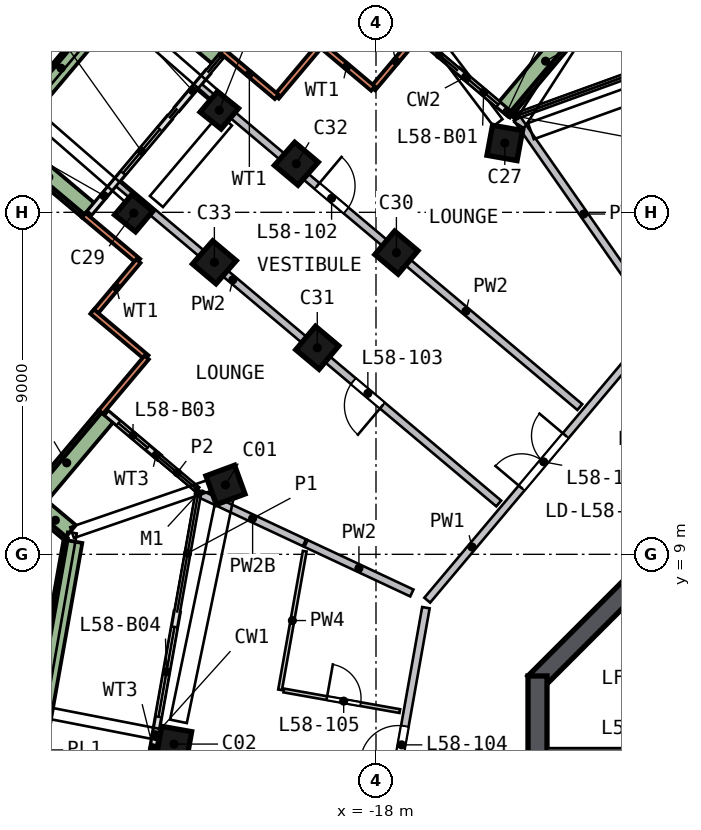
"""IFC4 building model, lengths in metres.
Left out: names, types, materials, properties, quantities, classifications, styles, units other than length and angle.
Written with IfcOpenShell. Run it as: python <this file> out.ifc"""

import sys

from ifc_helpers import new_model, si_unit, direction, frame, frame_2d, origin, origin_2d, place, context, subcontext, project, spatial, polyline, rectangle, outline, extrude, element, fill, save


model = new_model("IFC4")
c1 = context("Model", 3, precision=1e-05, world=origin(), true_north=direction((0.0, 1.0)))
c2 = subcontext(c1, "Body", "Model", "MODEL_VIEW")
j1 = project(units=[si_unit("LENGTHUNIT", "METRE"), si_unit("PLANEANGLEUNIT", "RADIAN")], contexts=[c1])
p1 = place(None, origin())
s1 = spatial("IfcSite", under=j1, at=p1, CompositionType="ELEMENT")
p2 = place(p1, origin())
s2 = spatial("IfcBuilding", under=s1, at=p2, CompositionType="ELEMENT")
p3 = place(p2, frame((0.0, 0.0, 237.5)))
s3 = spatial("IfcBuildingStorey", under=s2, at=p3, CompositionType="ELEMENT", Elevation=237.5)
p4 = place(p3, frame((-21.899, 10.952, 0.0), z_axis=(-0.051233202, -0.104594786, 0.993194387), x_axis=(-0.345877512, 0.934811029, 0.08060451)))
e1 = element("IfcColumn", 1, at=p4, inside=s3, PredefinedType="COLUMN", context=c2, shape_type="SweptSolid", body=[
    extrude(rectangle(XDim=0.8, YDim=0.8, at=origin_2d()), origin(), (0.0, 0.0, 1.0), 3.212),
])
p5 = place(p3, frame((-23.293, 4.141, 0.0), z_axis=(-0.018783788, -0.111029677, 0.993639562), x_axis=(-0.174054393, -0.978276827, -0.112603368)))
e2 = element("IfcColumn", 2, at=p5, inside=s3, PredefinedType="COLUMN", context=c2, shape_type="SweptSolid", body=[
    extrude(rectangle(XDim=0.8, YDim=0.8, at=origin_2d()), origin(), (0.0, 0.0, 1.0), 3.21),
])
p6 = place(p3, frame((-14.497, 19.91, 0.0), z_axis=(-0.094097867, -0.069699308, 0.993120133), x_axis=(0.980134973, -0.18142167, 0.080134963)))
e3 = element("IfcColumn", 3, at=p6, inside=s3, PredefinedType="COLUMN", context=c2, shape_type="SweptSolid", body=[
    extrude(rectangle(XDim=0.8, YDim=0.8, at=origin_2d()), origin(), (0.0, 0.0, 1.0), 3.212),
])
p7 = place(p3, frame((-21.863, 20.698, 0.0), z_axis=(-0.212105065, -0.008600875, 0.977209019), x_axis=(-0.619955277, -0.771799259, -0.141355432)))
e4 = element("IfcColumn", 4, at=p7, inside=s3, PredefinedType="COLUMN", context=c2, shape_type="SweptSolid", body=[
    extrude(rectangle(XDim=0.7, YDim=0.7, at=origin_2d()), origin(), (0.0, 0.0, 1.0), 3.264),
])
p8 = place(p3, frame((-24.129, 18.004, 0.0), z_axis=(-0.199957249, -0.019118522, 0.979618079), x_axis=(-0.621808188, -0.770197259, -0.141953371)))
e5 = element("IfcColumn", 5, at=p8, inside=s3, PredefinedType="COLUMN", context=c2, shape_type="SweptSolid", body=[
    extrude(rectangle(XDim=0.7, YDim=0.7, at=origin_2d()), origin(), (0.0, 0.0, 1.0), 3.256),
])
for number, where, z_axis, x_axis in (
    (6, (-17.366, 17.039, 0.0), (-0.08, -0.083, 0.993), (-0.765, 0.644, -0.008)),
    (7, (-19.463, 14.548, 0.0), (-0.068, -0.093, 0.993), (-0.766, 0.643, 0.008)),
):
    element("IfcColumn", number, at=place(p3, frame(where, z_axis=z_axis, x_axis=x_axis)), inside=s3, PredefinedType="COLUMN", context=c2, shape_type="SweptSolid", body=[
        extrude(rectangle(XDim=0.8, YDim=0.8, at=origin_2d()), origin(), (0.0, 0.0, 1.0), 3.211),
    ])
p9 = place(p3, frame((-19.843, 19.277, 0.0), z_axis=(-0.20588585, 0.000823843, 0.978575668), x_axis=(-0.742112726, 0.65170449, -0.156684267)))
e8 = element("IfcColumn", 8, at=p9, inside=s3, PredefinedType="COLUMN", context=c2, shape_type="SweptSolid", body=[
    extrude(rectangle(XDim=0.8, YDim=0.8, at=origin_2d()), origin(), (0.0, 0.0, 1.0), 3.26),
])
p10 = place(p3, frame((-22.015, 16.696, 0.0), z_axis=(-0.194071634, -0.009234356, 0.980943896), x_axis=(-0.745162414, 0.651744147, -0.141288865)))
e9 = element("IfcColumn", 9, at=p10, inside=s3, PredefinedType="COLUMN", context=c2, shape_type="SweptSolid", body=[
    extrude(rectangle(XDim=0.8, YDim=0.8, at=origin_2d()), origin(), (0.0, 0.0, 1.0), 3.252),
])
p11 = place(p3, frame((-5.622, 13.823, 0.0), z_axis=(0.0, 0.0, 1.0), x_axis=(-0.707106781, -0.707106781, 0.0)))
e10 = element("IfcWall", 10, at=p11, inside=s3, PredefinedType="SHEAR", context=c2, shape_type="SweptSolid", body=[
    extrude(rectangle(XDim=11.598, YDim=0.5, at=frame_2d((5.799, 0.0))), origin(), (0.0, 0.0, 1.0), 3.5),
])
p12 = place(p3, frame((-13.75, 5.799, 0.0), z_axis=(0.0, 0.0, 1.0), x_axis=(0.0, -1.0, 0.0)))
e11 = element("IfcWall", 11, at=p12, inside=s3, PredefinedType="SHEAR", context=c2, shape_type="SweptSolid", body=[
    extrude(rectangle(XDim=11.598, YDim=0.5, at=frame_2d((5.799, 0.0))), origin(), (0.0, 0.0, 1.0), 3.5),
])
p13 = place(p12, frame((4.899, 0.0, 0.0)))
e12 = element("IfcOpeningElement", 12, at=p13, cuts=e11, PredefinedType="OPENING", context=c2, shape_type="SweptSolid", body=[
    extrude(rectangle(XDim=1.8, YDim=2.1, at=frame_2d((0.9, 1.05))), frame((0.0, 0.26, 0.0), z_axis=(0.0, -1.0, 0.0), x_axis=(1.0, 0.0, 0.0)), (0.0, 0.0, 1.0), 0.52),
])
p14 = place(p3, frame((-16.871, 22.692, 0.0), z_axis=(0.0, 0.0, 1.0), x_axis=(-0.64389112, -0.765117132, 0.0)))
e13 = element("IfcWall", 13, at=p14, inside=s3, PredefinedType="SOLIDWALL", context=c2, shape_type="SweptSolid", body=[
    extrude(rectangle(XDim=1.875, YDim=0.15, at=frame_2d((0.938, 0.0))), origin(), (0.0, 0.0, 1.0), 3.19),
])
p15 = place(p3, frame((-18.079, 21.258, 0.0), z_axis=(0.0, 0.0, 1.0), x_axis=(-0.765188969, 0.643805749, 0.0)))
e14 = element("IfcWall", 14, at=p15, inside=s3, PredefinedType="SOLIDWALL", context=c2, shape_type="SweptSolid", body=[
    extrude(rectangle(XDim=1.8, YDim=0.15, at=frame_2d((0.9, 0.0))), origin(), (0.0, 0.0, 1.0), 3.19),
])
p16 = place(p3, frame((-19.408, 22.474, 0.0), z_axis=(0.0, 0.0, 1.0), x_axis=(-0.643826975, -0.765171109, 0.0)))
e15 = element("IfcWall", 15, at=p16, inside=s3, PredefinedType="SOLIDWALL", context=c2, shape_type="SweptSolid", body=[
    extrude(rectangle(XDim=1.875, YDim=0.15, at=frame_2d((0.938, 0.0))), origin(), (0.0, 0.0, 1.0), 3.19),
])
for number, where, z_axis, x_axis in (
    (16, (-20.615, 21.039, 0.0), (0.0, 0.0, 1.0), (-0.765, 0.644, 0.0)),
    (17, (-25.687, 17.923, 0.0), (0.0, 0.0, 1.0), (0.765, -0.644, 0.0)),
):
    element("IfcWall", number, at=place(p3, frame(where, z_axis=z_axis, x_axis=x_axis)), inside=s3, PredefinedType="SOLIDWALL", context=c2, shape_type="SweptSolid", body=[
        extrude(rectangle(XDim=1.875, YDim=0.15, at=frame_2d((0.938, 0.0))), origin(), (0.0, 0.0, 1.0), 3.19),
    ])
p17 = place(p3, frame((-24.253, 16.716, 0.0), z_axis=(0.0, 0.0, 1.0), x_axis=(-0.643872566, -0.765132746, 0.0)))
e18 = element("IfcWall", 18, at=p17, inside=s3, PredefinedType="SOLIDWALL", context=c2, shape_type="SweptSolid", body=[
    extrude(rectangle(XDim=1.8, YDim=0.15, at=frame_2d((0.9, 0.0))), origin(), (0.0, 0.0, 1.0), 3.19),
])
p18 = place(p3, frame((-25.469, 15.387, 0.0), z_axis=(0.0, 0.0, 1.0), x_axis=(0.765117132, -0.64389112, 0.0)))
e19 = element("IfcWall", 19, at=p18, inside=s3, PredefinedType="SOLIDWALL", context=c2, shape_type="SweptSolid", body=[
    extrude(rectangle(XDim=1.875, YDim=0.15, at=frame_2d((0.938, 0.0))), origin(), (0.0, 0.0, 1.0), 3.19),
])
p19 = place(p3, frame((-24.034, 14.18, 0.0), z_axis=(0.0, 0.0, 1.0), x_axis=(-0.643826975, -0.765171109, 0.0)))
e20 = element("IfcWall", 20, at=p19, inside=s3, PredefinedType="SOLIDWALL", context=c2, shape_type="SweptSolid", body=[
    extrude(rectangle(XDim=1.875, YDim=0.15, at=frame_2d((0.938, 0.0))), origin(), (0.0, 0.0, 1.0), 3.19),
])
p20 = place(p3, frame((-14.478, 20.58, 0.0), z_axis=(0.0, 0.0, 1.0), x_axis=(-0.765132746, 0.643872566, 0.0)))
e21 = element("IfcWall", 21, at=p20, inside=s3, PredefinedType="SOLIDWALL", context=c2, shape_type="SweptSolid", body=[
    extrude(rectangle(XDim=1.8, YDim=0.15, at=frame_2d((0.9, 0.0))), origin(), (0.0, 0.0, 1.0), 2.525),
])
p21 = place(p20, frame((0.4, 0.0, 0.0)))
e22 = element("IfcOpeningElement", 22, at=p21, cuts=e21, PredefinedType="OPENING", context=c2, shape_type="SweptSolid", body=[
    extrude(rectangle(XDim=1.0, YDim=2.4, at=frame_2d((0.5, 1.2))), frame((0.0, 0.085, 0.0), z_axis=(0.0, -1.0, 0.0), x_axis=(1.0, 0.0, 0.0)), (0.0, 0.0, 1.0), 0.17),
])
p22 = place(p3, frame((-23.431, 20.488, 0.0), z_axis=(0.0, 0.0, 1.0), x_axis=(-0.643838196, -0.765161667, 0.0)))
e23 = element("IfcWall", 23, at=p22, inside=s3, PredefinedType="SOLIDWALL", context=c2, shape_type="SweptSolid", body=[
    extrude(rectangle(XDim=3.26, YDim=0.15, at=frame_2d((1.63, 0.0))), origin(), (0.0, 0.0, 1.0), 2.525),
])
p23 = place(p22, frame((0.4, 0.0, 0.0)))
e24 = element("IfcOpeningElement", 24, at=p23, cuts=e23, PredefinedType="OPENING", context=c2, shape_type="SweptSolid", body=[
    extrude(rectangle(XDim=1.5, YDim=2.4, at=frame_2d((0.75, 1.2))), frame((0.0, 0.085, 0.0), z_axis=(0.0, -1.0, 0.0), x_axis=(1.0, 0.0, 0.0)), (0.0, 0.0, 1.0), 0.17),
])
p24 = place(p3, frame((-22.42, 21.689, 0.0), z_axis=(0.0, 0.0, 1.0), x_axis=(-0.643815345, -0.765180895, 0.0)))
e25 = element("IfcWall", 25, at=p24, inside=s3, PredefinedType="SOLIDWALL", context=c2, shape_type="SweptSolid", body=[
    extrude(rectangle(XDim=1.267, YDim=0.15, at=frame_2d((0.634, 0.0))), origin(), (0.0, 0.0, 1.0), 2.525),
])
p25 = place(p3, frame((-25.082, 12.709, 0.0), z_axis=(0.0, 0.0, 1.0), x_axis=(0.765132746, -0.643872566, 0.0)))
e26 = element("IfcWall", 26, at=p25, inside=s3, PredefinedType="SOLIDWALL", context=c2, shape_type="SweptSolid", body=[
    extrude(rectangle(XDim=1.8, YDim=0.15, at=frame_2d((0.9, 0.0))), origin(), (0.0, 0.0, 1.0), 2.525),
])
p26 = place(p25, frame((0.4, 0.0, 0.0)))
e27 = element("IfcOpeningElement", 27, at=p26, cuts=e26, PredefinedType="OPENING", context=c2, shape_type="SweptSolid", body=[
    extrude(rectangle(XDim=1.0, YDim=2.4, at=frame_2d((0.5, 1.2))), frame((0.0, 0.085, 0.0), z_axis=(0.0, -1.0, 0.0), x_axis=(1.0, 0.0, 0.0)), (0.0, 0.0, 1.0), 0.17),
])
p27 = place(p3, frame((-23.232, 7.482, 0.0), z_axis=(0.0, 0.0, 1.0), x_axis=(-0.175042897, -0.984560808, 0.0)))
e28 = element("IfcWall", 28, at=p27, inside=s3, PredefinedType="SOLIDWALL", context=c2, shape_type="SweptSolid", body=[
    extrude(rectangle(XDim=3.3, YDim=0.15, at=frame_2d((1.65, 0.0))), origin(), (0.0, 0.0, 1.0), 2.525),
])
p28 = place(p27, frame((0.4, 0.0, 0.0)))
e29 = element("IfcOpeningElement", 29, at=p28, cuts=e28, PredefinedType="OPENING", context=c2, shape_type="SweptSolid", body=[
    extrude(rectangle(XDim=2.4, YDim=2.4, at=frame_2d((1.2, 1.2))), frame((0.0, 0.085, 0.0), z_axis=(0.0, -1.0, 0.0), x_axis=(1.0, 0.0, 0.0)), (0.0, 0.0, 1.0), 0.17),
])
p29 = place(p3, frame((-23.81, 4.233, 0.0), z_axis=(0.0, 0.0, 1.0), x_axis=(-0.175040517, -0.984561231, 0.0)))
e30 = element("IfcWall", 30, at=p29, inside=s3, PredefinedType="SOLIDWALL", context=c2, shape_type="SweptSolid", body=[
    extrude(rectangle(XDim=3.661, YDim=0.15, at=frame_2d((1.831, 0.0))), origin(), (0.0, 0.0, 1.0), 2.525),
])
p30 = place(p29, frame((0.861, 0.0, 0.0)))
e31 = element("IfcOpeningElement", 31, at=p30, cuts=e30, PredefinedType="OPENING", context=c2, shape_type="SweptSolid", body=[
    extrude(rectangle(XDim=2.4, YDim=2.4, at=frame_2d((1.2, 1.2))), frame((0.0, 0.085, 0.0), z_axis=(0.0, -1.0, 0.0), x_axis=(1.0, 0.0, 0.0)), (0.0, 0.0, 1.0), 0.17),
])
p31 = place(p3, frame((-22.163, 22.113, 0.0), z_axis=(0.0, 0.0, 1.0), x_axis=(-0.765103138, 0.643907748, 0.0)))
e32 = element("IfcWall", 32, at=p31, inside=s3, PredefinedType="SOLIDWALL", context=c2, shape_type="SweptSolid", body=[
    extrude(rectangle(XDim=3.199, YDim=0.5, at=frame_2d((1.6, 0.0))), origin(), (0.0, 0.0, 1.0), 0.7),
])
p32 = place(p3, frame((-24.58, 23.821, 0.0), z_axis=(0.0, 0.0, 1.0), x_axis=(-0.643856249, -0.765146476, 0.0)))
e33 = element("IfcWall", 33, at=p32, inside=s3, PredefinedType="SOLIDWALL", context=c2, shape_type="SweptSolid", body=[
    extrude(rectangle(XDim=5.3, YDim=0.5, at=frame_2d((2.65, 0.0))), origin(), (0.0, 0.0, 1.0), 0.7),
])
p33 = place(p3, frame((-27.641, 19.796, 0.0), z_axis=(0.0, 0.0, 1.0), x_axis=(0.765150401, -0.643851585, 0.0)))
e34 = element("IfcWall", 34, at=p33, inside=s3, PredefinedType="SOLIDWALL", context=c2, shape_type="SweptSolid", body=[
    extrude(rectangle(XDim=2.699, YDim=0.5, at=frame_2d((1.35, 0.0))), origin(), (0.0, 0.0, 1.0), 0.7),
])
p34 = place(p3, frame((-25.108, 12.632, 0.0), z_axis=(0.0, 0.0, 1.0), x_axis=(-0.64382547, -0.765172376, 0.0)))
e35 = element("IfcWall", 35, at=p34, inside=s3, PredefinedType="SOLIDWALL", context=c2, shape_type="SweptSolid", body=[
    extrude(rectangle(XDim=3.199, YDim=0.5, at=frame_2d((1.6, 0.0))), origin(), (0.0, 0.0, 1.0), 0.7),
])
p35 = place(p3, frame((-26.816, 10.214, 0.0), z_axis=(0.0, 0.0, 1.0), x_axis=(0.765135313, -0.643869516, 0.0)))
e36 = element("IfcWall", 36, at=p35, inside=s3, PredefinedType="SOLIDWALL", context=c2, shape_type="SweptSolid", body=[
    extrude(rectangle(XDim=0.989, YDim=0.5, at=frame_2d((0.494, 0.0))), origin(), (0.0, 0.0, 1.0), 0.7),
])
p36 = place(p3, frame((-25.974, 9.343, 0.0), z_axis=(0.0, 0.0, 1.0), x_axis=(-0.175017773, -0.984565274, 0.0)))
e37 = element("IfcWall", 37, at=p36, inside=s3, PredefinedType="SOLIDWALL", context=c2, shape_type="SweptSolid", body=[
    extrude(rectangle(XDim=11.153, YDim=0.5, at=frame_2d((5.576, 0.0))), origin(), (0.0, 0.0, 1.0), 0.7),
])
p37 = place(p3, frame((-14.567, 20.754, 0.0), z_axis=(0.0, 0.0, 1.0), x_axis=(0.643863069, 0.765140738, 0.0)))
e38 = element("IfcWall", 38, at=p37, inside=s3, PredefinedType="SOLIDWALL", context=c2, shape_type="SweptSolid", body=[
    extrude(rectangle(XDim=3.199, YDim=0.5, at=frame_2d((1.599, 0.0))), origin(), (0.0, 0.0, 1.0), 0.7),
])
p38 = place(p3, origin())
e39 = element("IfcWall", 39, at=p38, inside=s3, PredefinedType="SOLIDWALL", context=c2, shape_type="SweptSolid", body=[
    extrude(outline(polyline([(-13.5, 3.9), (-9.9, 3.9), (-9.9, 3.7), (-12.9, 3.7), (-12.9, 1.4), (-9.9, 1.4), (-9.9, 1.2), (-13.5, 1.2), (-13.5, 3.9)])), origin(), (0.0, 0.0, 1.0), 3.19),
])
p39 = place(p3, frame((-18.317, -1.577, 0.0), z_axis=(0.0, 0.0, 1.0), x_axis=(0.175025996, 0.984563812, 0.0)))
e40 = element("IfcWall", 40, at=p39, inside=s3, PredefinedType="SOLIDWALL", context=c2, shape_type="SweptSolid", body=[
    extrude(rectangle(XDim=9.316, YDim=0.2, at=frame_2d((4.658, 0.0))), origin(), (0.0, 0.0, 1.0), 3.19),
])
p40 = place(p39, frame((5.15, 0.0, 0.0)))
e41 = element("IfcOpeningElement", 41, at=p40, cuts=e40, PredefinedType="OPENING", context=c2, shape_type="SweptSolid", body=[
    extrude(rectangle(XDim=1.0, YDim=2.1, at=frame_2d((0.5, 1.05))), frame((0.0, 0.11, 0.0), z_axis=(0.0, -1.0, 0.0), x_axis=(1.0, 0.0, 0.0)), (0.0, 0.0, 1.0), 0.22),
])
p41 = place(p3, frame((-16.651, 7.793, 0.0), z_axis=(0.0, 0.0, 1.0), x_axis=(0.64385004, 0.765151702, 0.0)))
e42 = element("IfcWall", 42, at=p41, inside=s3, PredefinedType="SOLIDWALL", context=c2, shape_type="SweptSolid", body=[
    extrude(rectangle(XDim=9.317, YDim=0.2, at=frame_2d((4.658, 0.0))), origin(), (0.0, 0.0, 1.0), 3.19),
])
p42 = place(p41, frame((3.858, 0.0, 0.0)))
e43 = element("IfcOpeningElement", 43, at=p42, cuts=e42, PredefinedType="OPENING", context=c2, shape_type="SweptSolid", body=[
    extrude(rectangle(XDim=1.8, YDim=2.1, at=frame_2d((0.9, 1.05))), frame((0.0, 0.11, 0.0), z_axis=(0.0, -1.0, 0.0), x_axis=(1.0, 0.0, 0.0)), (0.0, 0.0, 1.0), 0.22),
])
p43 = place(p3, frame((-19.883, 9.305, 0.0), z_axis=(0.0, 0.0, 1.0), x_axis=(-0.905735258, 0.423843889, 0.0)))
e44 = element("IfcWall", 44, at=p43, inside=s3, PredefinedType="SOLIDWALL", context=c2, shape_type="SweptSolid", body=[
    extrude(rectangle(XDim=3.011, YDim=0.2, at=frame_2d((1.506, 0.0))), origin(), (0.0, 0.0, 1.0), 2.69),
])
p44 = place(p3, frame((-14.771, 10.338, 0.0), z_axis=(0.0, 0.0, 1.0), x_axis=(-0.765135633, 0.643869135, 0.0)))
e45 = element("IfcWall", 45, at=p44, inside=s3, PredefinedType="SOLIDWALL", context=c2, shape_type="SweptSolid", body=[
    extrude(rectangle(XDim=13.086, YDim=0.2, at=frame_2d((6.543, 0.0))), origin(), (0.0, 0.0, 1.0), 3.19),
])
p45 = place(p44, frame((4.0, 0.0, 0.0)))
e46 = element("IfcOpeningElement", 46, at=p45, cuts=e45, PredefinedType="OPENING", context=c2, shape_type="SweptSolid", body=[
    extrude(rectangle(XDim=1.0, YDim=2.1, at=frame_2d((0.5, 1.05))), frame((0.0, 0.11, 0.0), z_axis=(0.0, -1.0, 0.0), x_axis=(1.0, 0.0, 0.0)), (0.0, 0.0, 1.0), 0.22),
])
p46 = place(p3, frame((-17.056, 7.983, 0.0), z_axis=(0.0, 0.0, 1.0), x_axis=(-0.90573433, 0.423845871, 0.0)))
e47 = element("IfcWall", 47, at=p46, inside=s3, PredefinedType="SOLIDWALL", context=c2, shape_type="SweptSolid", body=[
    extrude(rectangle(XDim=3.075, YDim=0.2, at=frame_2d((1.537, 0.0))), origin(), (0.0, 0.0, 1.0), 3.19),
])
p47 = place(p3, frame((-22.65, 21.3, 0.0), z_axis=(0.0, 0.0, 1.0), x_axis=(0.765152558, -0.643849022, 0.0)))
e48 = element("IfcWall", 48, at=p47, inside=s3, PredefinedType="SOLIDWALL", context=c2, shape_type="SweptSolid", body=[
    extrude(rectangle(XDim=13.086, YDim=0.2, at=frame_2d((6.543, 0.0))), origin(), (0.0, 0.0, 1.0), 3.19),
])
p48 = place(p47, frame((4.05, 0.0, 0.0)))
e49 = element("IfcOpeningElement", 49, at=p48, cuts=e48, PredefinedType="OPENING", context=c2, shape_type="SweptSolid", body=[
    extrude(rectangle(XDim=1.0, YDim=2.1, at=frame_2d((0.5, 1.05))), frame((0.0, 0.11, 0.0), z_axis=(0.0, -1.0, 0.0), x_axis=(1.0, 0.0, 0.0)), (0.0, 0.0, 1.0), 0.22),
])
p49 = place(p3, frame((-14.29, 20.469, 0.0), z_axis=(0.0, 0.0, 1.0), x_axis=(0.572451851, -0.819938338, 0.0)))
e50 = element("IfcWall", 50, at=p49, inside=s3, PredefinedType="SOLIDWALL", context=c2, shape_type="SweptSolid", body=[
    extrude(rectangle(XDim=6.132, YDim=0.2, at=frame_2d((3.066, 0.0))), origin(), (0.0, 0.0, 1.0), 2.69),
])
p50 = place(p3, frame((-20.524, 5.434, 0.0), z_axis=(0.0, 0.0, 1.0), x_axis=(0.17499216, 0.984569827, 0.0)))
e51 = element("IfcWall", 51, at=p50, inside=s3, PredefinedType="PARTITIONING", context=c2, shape_type="SweptSolid", body=[
    extrude(rectangle(XDim=3.704, YDim=0.1, at=frame_2d((1.852, 0.0))), origin(), (0.0, 0.0, 1.0), 3.19),
])
p51 = place(p3, frame((-20.426, 5.417, 0.0), z_axis=(0.0, 0.0, 1.0), x_axis=(0.984556777, -0.175065567, 0.0)))
e52 = element("IfcWall", 52, at=p51, inside=s3, PredefinedType="PARTITIONING", context=c2, shape_type="SweptSolid", body=[
    extrude(rectangle(XDim=3.1, YDim=0.1, at=frame_2d((1.55, 0.0))), origin(), (0.0, 0.0, 1.0), 3.19),
])
p52 = place(p51, frame((1.15, 0.0, 0.0)))
e53 = element("IfcOpeningElement", 53, at=p52, cuts=e52, PredefinedType="OPENING", context=c2, shape_type="SweptSolid", body=[
    extrude(rectangle(XDim=0.9, YDim=2.1, at=frame_2d((0.45, 1.05))), frame((0.0, 0.06, 0.0), z_axis=(0.0, -1.0, 0.0), x_axis=(1.0, 0.0, 0.0)), (0.0, 0.0, 1.0), 0.12),
])
p53 = place(p21, origin())
e54 = element("IfcDoor", 54, at=p53, inside=s3, OperationType="SLIDING_TO_LEFT", PredefinedType="DOOR", context=c2, shape_type="SweptSolid", body=[
    extrude(rectangle(XDim=1.0, YDim=2.4, at=frame_2d((0.5, 1.2))), frame((0.0, 0.025, 0.0), z_axis=(0.0, -1.0, 0.0), x_axis=(1.0, 0.0, 0.0)), (0.0, 0.0, 1.0), 0.05),
])
fill(e22, e54)
p54 = place(p23, origin())
e55 = element("IfcDoor", 55, at=p54, inside=s3, OperationType="SLIDING_TO_RIGHT", PredefinedType="DOOR", context=c2, shape_type="SweptSolid", body=[
    extrude(rectangle(XDim=1.5, YDim=2.4, at=frame_2d((0.75, 1.2))), frame((0.0, 0.025, 0.0), z_axis=(0.0, -1.0, 0.0), x_axis=(1.0, 0.0, 0.0)), (0.0, 0.0, 1.0), 0.05),
])
fill(e24, e55)
p55 = place(p26, origin())
e56 = element("IfcDoor", 56, at=p55, inside=s3, OperationType="SLIDING_TO_LEFT", PredefinedType="DOOR", context=c2, shape_type="SweptSolid", body=[
    extrude(rectangle(XDim=1.0, YDim=2.4, at=frame_2d((0.5, 1.2))), frame((0.0, 0.025, 0.0), z_axis=(0.0, -1.0, 0.0), x_axis=(1.0, 0.0, 0.0)), (0.0, 0.0, 1.0), 0.05),
])
fill(e27, e56)
p56 = place(p28, origin())
e57 = element("IfcDoor", 57, at=p56, inside=s3, OperationType="SLIDING_TO_RIGHT", PredefinedType="DOOR", context=c2, shape_type="SweptSolid", body=[
    extrude(rectangle(XDim=2.4, YDim=2.4, at=frame_2d((1.2, 1.2))), frame((0.0, 0.025, 0.0), z_axis=(0.0, -1.0, 0.0), x_axis=(1.0, 0.0, 0.0)), (0.0, 0.0, 1.0), 0.05),
])
fill(e29, e57)
p57 = place(p42, origin())
e58 = element("IfcDoor", 58, at=p57, inside=s3, OperationType="DOUBLE_DOOR_SINGLE_SWING", PredefinedType="DOOR", context=c2, shape_type="SweptSolid", body=[
    extrude(rectangle(XDim=1.8, YDim=2.1, at=frame_2d((0.9, 1.05))), frame((0.0, 0.025, 0.0), z_axis=(0.0, -1.0, 0.0), x_axis=(1.0, 0.0, 0.0)), (0.0, 0.0, 1.0), 0.05),
])
fill(e43, e58)
p58 = place(p48, origin())
e59 = element("IfcDoor", 59, at=p58, inside=s3, OperationType="SINGLE_SWING_LEFT", PredefinedType="DOOR", context=c2, shape_type="SweptSolid", body=[
    extrude(rectangle(XDim=1.0, YDim=2.1, at=frame_2d((0.5, 1.05))), frame((0.0, 0.025, 0.0), z_axis=(0.0, -1.0, 0.0), x_axis=(1.0, 0.0, 0.0)), (0.0, 0.0, 1.0), 0.05),
])
fill(e49, e59)
p59 = place(p45, origin())
e60 = element("IfcDoor", 60, at=p59, inside=s3, OperationType="SINGLE_SWING_LEFT", PredefinedType="DOOR", context=c2, shape_type="SweptSolid", body=[
    extrude(rectangle(XDim=1.0, YDim=2.1, at=frame_2d((0.5, 1.05))), frame((0.0, 0.025, 0.0), z_axis=(0.0, -1.0, 0.0), x_axis=(1.0, 0.0, 0.0)), (0.0, 0.0, 1.0), 0.05),
])
fill(e46, e60)
p60 = place(p40, origin())
e61 = element("IfcDoor", 61, at=p60, inside=s3, OperationType="SINGLE_SWING_LEFT", PredefinedType="DOOR", context=c2, shape_type="SweptSolid", body=[
    extrude(rectangle(XDim=1.0, YDim=2.1, at=frame_2d((0.5, 1.05))), frame((0.0, 0.025, 0.0), z_axis=(0.0, -1.0, 0.0), x_axis=(1.0, 0.0, 0.0)), (0.0, 0.0, 1.0), 0.05),
])
fill(e41, e61)
p61 = place(p52, origin())
e62 = element("IfcDoor", 62, at=p61, inside=s3, OperationType="SINGLE_SWING_LEFT", PredefinedType="DOOR", context=c2, shape_type="SweptSolid", body=[
    extrude(rectangle(XDim=0.9, YDim=2.1, at=frame_2d((0.45, 1.05))), frame((0.0, 0.025, 0.0), z_axis=(0.0, -1.0, 0.0), x_axis=(1.0, 0.0, 0.0)), (0.0, 0.0, 1.0), 0.05),
])
fill(e53, e62)
save(model, sys.argv[1])
